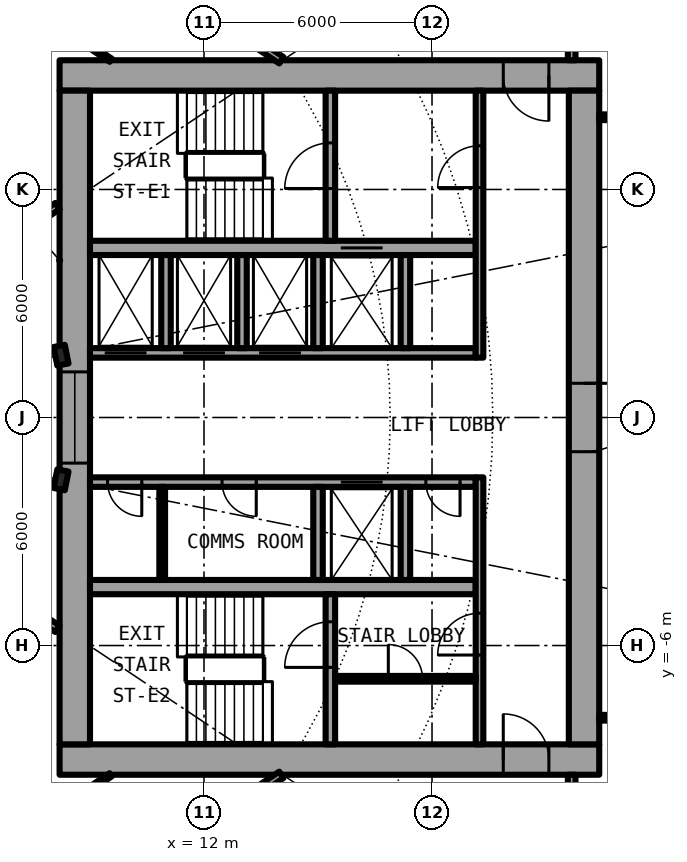
"""IFC4 building model, lengths in metres.
Left out: names, types, materials, properties, quantities, classifications, styles, units other than length and angle.
Written with IfcOpenShell. Run it as: python <this file> out.ifc"""

import sys

from ifc_helpers import new_model, si_unit, direction, frame, frame_2d, origin, origin_2d, place, context, subcontext, project, spatial, rectangle, i_section, extrude, element, fill, save


model = new_model("IFC4")
c1 = context("Model", 3, precision=1e-05, world=origin(), true_north=direction((0.0, 1.0)))
c2 = subcontext(c1, "Body", "Model", "MODEL_VIEW")
j1 = project(units=[si_unit("LENGTHUNIT", "METRE"), si_unit("PLANEANGLEUNIT", "RADIAN")], contexts=[c1])
p1 = place(None, origin())
s1 = spatial("IfcSite", under=j1, at=p1, CompositionType="ELEMENT")
p2 = place(p1, origin())
s2 = spatial("IfcBuilding", under=s1, at=p2, CompositionType="ELEMENT")
p3 = place(p2, frame((0.0, 0.0, 31.95)))
s3 = spatial("IfcBuildingStorey", under=s2, at=p3, CompositionType="ELEMENT", Elevation=31.95)
for number, where, z_axis, x_axis in (
    (1, (8.239, 1.639, 0.0), (0.0, 0.0, 1.0), (0.981, 0.195, 0.0)),
    (2, (8.239, -1.639, 0.0), (0.0, 0.0, 1.0), (0.981, -0.195, 0.0)),
):
    element("IfcColumn", number, at=place(p3, frame(where, z_axis=z_axis, x_axis=x_axis)), inside=s3, PredefinedType="COLUMN", context=c2, shape_type="SweptSolid", body=[
        extrude(i_section(OverallWidth=0.3, OverallDepth=0.5, WebThickness=0.014, FlangeThickness=0.028, FilletRadius=0.027, at=origin_2d()), origin(), (0.0, 0.0, 1.0), 3.05),
    ])
p4 = place(p3, frame((22.4, 9.0, 0.0), z_axis=(0.0, 0.0, 1.0), x_axis=(-1.0, 0.0, 0.0)))
e3 = element("IfcWall", 3, at=p4, inside=s3, PredefinedType="SHEAR", context=c2, shape_type="SweptSolid", body=[
    extrude(rectangle(XDim=14.2, YDim=0.8, at=frame_2d((7.1, 0.0))), origin(), (0.0, 0.0, 1.0), 3.05),
])
p5 = place(p4, frame((1.325, 0.0, 0.0)))
e4 = element("IfcOpeningElement", 4, at=p5, cuts=e3, PredefinedType="OPENING", context=c2, shape_type="SweptSolid", body=[
    extrude(rectangle(XDim=1.2, YDim=2.3, at=frame_2d((0.6, 1.15))), frame((0.0, 0.41, 0.0), z_axis=(0.0, -1.0, 0.0), x_axis=(1.0, 0.0, 0.0)), (0.0, 0.0, 1.0), 0.82),
])
p6 = place(p3, frame((8.2, -9.0, 0.0), z_axis=(0.0, 0.0, 1.0), x_axis=(1.0, 0.0, 0.0)))
e5 = element("IfcWall", 5, at=p6, inside=s3, PredefinedType="SHEAR", context=c2, shape_type="SweptSolid", body=[
    extrude(rectangle(XDim=14.2, YDim=0.8, at=frame_2d((7.1, 0.0))), origin(), (0.0, 0.0, 1.0), 3.05),
])
p7 = place(p6, frame((11.675, 0.0, 0.0)))
e6 = element("IfcOpeningElement", 6, at=p7, cuts=e5, PredefinedType="OPENING", context=c2, shape_type="SweptSolid", body=[
    extrude(rectangle(XDim=1.2, YDim=2.3, at=frame_2d((0.6, 1.15))), frame((0.0, 0.41, 0.0), z_axis=(0.0, -1.0, 0.0), x_axis=(1.0, 0.0, 0.0)), (0.0, 0.0, 1.0), 0.82),
])
p8 = place(p3, frame((22.0, 8.6, 0.0), z_axis=(0.0, 0.0, 1.0), x_axis=(0.0, -1.0, 0.0)))
e7 = element("IfcWall", 7, at=p8, inside=s3, PredefinedType="SHEAR", context=c2, shape_type="SweptSolid", body=[
    extrude(rectangle(XDim=17.2, YDim=0.8, at=frame_2d((8.6, 0.0))), origin(), (0.0, 0.0, 1.0), 3.05),
])
p9 = place(p8, frame((7.7, 0.0, 0.0)))
e8 = element("IfcOpeningElement", 8, at=p9, cuts=e7, PredefinedType="OPENING", context=c2, shape_type="SweptSolid", body=[
    extrude(rectangle(XDim=1.8, YDim=2.3, at=frame_2d((0.9, 1.15))), frame((0.0, 0.41, 0.0), z_axis=(0.0, -1.0, 0.0), x_axis=(1.0, 0.0, 0.0)), (0.0, 0.0, 1.0), 0.82),
])
p10 = place(p3, frame((8.6, -8.6, 0.0), z_axis=(0.0, 0.0, 1.0), x_axis=(0.0, 1.0, 0.0)))
e9 = element("IfcWall", 9, at=p10, inside=s3, PredefinedType="SHEAR", context=c2, shape_type="SweptSolid", body=[
    extrude(rectangle(XDim=17.2, YDim=0.8, at=frame_2d((8.6, 0.0))), origin(), (0.0, 0.0, 1.0), 3.05),
])
p11 = place(p10, frame((7.4, 0.0, 0.1)))
e10 = element("IfcOpeningElement", 10, at=p11, cuts=e9, PredefinedType="OPENING", context=c2, shape_type="SweptSolid", body=[
    extrude(rectangle(XDim=2.4, YDim=2.2, at=frame_2d((1.2, 1.1))), frame((0.0, 0.41, 0.0), z_axis=(0.0, -1.0, 0.0), x_axis=(1.0, 0.0, 0.0)), (0.0, 0.0, 1.0), 0.82),
])
p12 = place(p3, frame((9.0, 1.7, 0.0), z_axis=(0.0, 0.0, 1.0), x_axis=(1.0, 0.0, 0.0)))
e11 = element("IfcWall", 11, at=p12, inside=s3, PredefinedType="SHEAR", context=c2, shape_type="SweptSolid", body=[
    extrude(rectangle(XDim=10.15, YDim=0.25, at=frame_2d((5.075, 0.0))), origin(), (0.0, 0.0, 1.0), 3.05),
])
p13 = place(p12, frame((0.387, 0.0, 0.0)))
e12 = element("IfcOpeningElement", 12, at=p13, cuts=e11, PredefinedType="OPENING", context=c2, shape_type="SweptSolid", body=[
    extrude(rectangle(XDim=1.1, YDim=2.3, at=frame_2d((0.55, 1.15))), frame((0.0, 0.135, 0.0), z_axis=(0.0, -1.0, 0.0), x_axis=(1.0, 0.0, 0.0)), (0.0, 0.0, 1.0), 0.27),
])
p14 = place(p12, frame((2.45, 0.0, 0.0)))
e13 = element("IfcOpeningElement", 13, at=p14, cuts=e11, PredefinedType="OPENING", context=c2, shape_type="SweptSolid", body=[
    extrude(rectangle(XDim=1.1, YDim=2.3, at=frame_2d((0.55, 1.15))), frame((0.0, 0.135, 0.0), z_axis=(0.0, -1.0, 0.0), x_axis=(1.0, 0.0, 0.0)), (0.0, 0.0, 1.0), 0.27),
])
p15 = place(p12, frame((4.45, 0.0, 0.0)))
e14 = element("IfcOpeningElement", 14, at=p15, cuts=e11, PredefinedType="OPENING", context=c2, shape_type="SweptSolid", body=[
    extrude(rectangle(XDim=1.1, YDim=2.3, at=frame_2d((0.55, 1.15))), frame((0.0, 0.135, 0.0), z_axis=(0.0, -1.0, 0.0), x_axis=(1.0, 0.0, 0.0)), (0.0, 0.0, 1.0), 0.27),
])
p16 = place(p3, frame((9.0, 4.462, 0.0), z_axis=(0.0, 0.0, 1.0), x_axis=(1.0, 0.0, 0.0)))
e15 = element("IfcWall", 15, at=p16, inside=s3, PredefinedType="SHEAR", context=c2, shape_type="SweptSolid", body=[
    extrude(rectangle(XDim=10.15, YDim=0.375, at=frame_2d((5.075, 0.0))), origin(), (0.0, 0.0, 1.0), 3.05),
])
p17 = place(p16, frame((6.6, 0.0, 0.0)))
e16 = element("IfcOpeningElement", 16, at=p17, cuts=e15, PredefinedType="OPENING", context=c2, shape_type="SweptSolid", body=[
    extrude(rectangle(XDim=1.1, YDim=2.3, at=frame_2d((0.55, 1.15))), frame((0.0, 0.198, 0.0), z_axis=(0.0, -1.0, 0.0), x_axis=(1.0, 0.0, 0.0)), (0.0, 0.0, 1.0), 0.395),
])
p18 = place(p3, frame((15.325, 4.65, 0.0), z_axis=(0.0, 0.0, 1.0), x_axis=(0.0, 1.0, 0.0)))
e17 = element("IfcWall", 17, at=p18, inside=s3, PredefinedType="SHEAR", context=c2, shape_type="SweptSolid", body=[
    extrude(rectangle(XDim=3.95, YDim=0.25, at=frame_2d((1.975, 0.0))), origin(), (0.0, 0.0, 1.0), 3.05),
])
p19 = place(p18, frame((1.375, 0.0, 0.0)))
e18 = element("IfcOpeningElement", 18, at=p19, cuts=e17, PredefinedType="OPENING", context=c2, shape_type="SweptSolid", body=[
    extrude(rectangle(XDim=1.2, YDim=2.3, at=frame_2d((0.6, 1.15))), frame((0.0, 0.135, 0.0), z_axis=(0.0, -1.0, 0.0), x_axis=(1.0, 0.0, 0.0)), (0.0, 0.0, 1.0), 0.27),
])
for number, where, z_axis, x_axis in (
    (19, (15.0, 1.825, 0.0), (0.0, 0.0, 1.0), (0.0, 1.0, 0.0)),
    (20, (17.3, 1.825, 0.0), (0.0, 0.0, 1.0), (0.0, 1.0, 0.0)),
):
    element("IfcWall", number, at=place(p3, frame(where, z_axis=z_axis, x_axis=x_axis)), inside=s3, PredefinedType="SOLIDWALL", context=c2, shape_type="SweptSolid", body=[
        extrude(rectangle(XDim=2.45, YDim=0.25, at=frame_2d((1.225, 0.0))), origin(), (0.0, 0.0, 1.0), 2.7),
    ])
p20 = place(p3, frame((19.25, 1.575, 0.0), z_axis=(0.0, 0.0, 1.0), x_axis=(0.0, 1.0, 0.0)))
e21 = element("IfcWall", 21, at=p20, inside=s3, PredefinedType="SOLIDWALL", context=c2, shape_type="SweptSolid", body=[
    extrude(rectangle(XDim=7.025, YDim=0.2, at=frame_2d((3.513, 0.0))), origin(), (0.0, 0.0, 1.0), 2.7),
])
p21 = place(p20, frame((4.475, 0.0, 0.0)))
e22 = element("IfcOpeningElement", 22, at=p21, cuts=e21, PredefinedType="OPENING", context=c2, shape_type="SweptSolid", body=[
    extrude(rectangle(XDim=1.1, YDim=2.3, at=frame_2d((0.55, 1.15))), frame((0.0, 0.11, 0.0), z_axis=(0.0, -1.0, 0.0), x_axis=(1.0, 0.0, 0.0)), (0.0, 0.0, 1.0), 0.22),
])
p22 = place(p3, frame((19.15, -1.7, 0.0), z_axis=(0.0, 0.0, 1.0), x_axis=(-1.0, 0.0, 0.0)))
e23 = element("IfcWall", 23, at=p22, inside=s3, PredefinedType="SHEAR", context=c2, shape_type="SweptSolid", body=[
    extrude(rectangle(XDim=10.15, YDim=0.25, at=frame_2d((5.075, 0.0))), origin(), (0.0, 0.0, 1.0), 3.05),
])
p23 = place(p22, frame((2.45, 0.0, 0.0)))
e24 = element("IfcOpeningElement", 24, at=p23, cuts=e23, PredefinedType="OPENING", context=c2, shape_type="SweptSolid", body=[
    extrude(rectangle(XDim=1.1, YDim=2.3, at=frame_2d((0.55, 1.15))), frame((0.0, 0.135, 0.0), z_axis=(0.0, -1.0, 0.0), x_axis=(1.0, 0.0, 0.0)), (0.0, 0.0, 1.0), 0.27),
])
p24 = place(p22, frame((8.788, 0.0, 0.0)))
e25 = element("IfcOpeningElement", 25, at=p24, cuts=e23, PredefinedType="OPENING", context=c2, shape_type="SweptSolid", body=[
    extrude(rectangle(XDim=0.9, YDim=2.3, at=frame_2d((0.45, 1.15))), frame((0.0, 0.135, 0.0), z_axis=(0.0, -1.0, 0.0), x_axis=(1.0, 0.0, 0.0)), (0.0, 0.0, 1.0), 0.27),
])
p25 = place(p22, frame((5.775, 0.0, 0.0)))
e26 = element("IfcOpeningElement", 26, at=p25, cuts=e23, PredefinedType="OPENING", context=c2, shape_type="SweptSolid", body=[
    extrude(rectangle(XDim=0.9, YDim=2.3, at=frame_2d((0.45, 1.15))), frame((0.0, 0.135, 0.0), z_axis=(0.0, -1.0, 0.0), x_axis=(1.0, 0.0, 0.0)), (0.0, 0.0, 1.0), 0.27),
])
p26 = place(p22, frame((0.413, 0.0, 0.0)))
e27 = element("IfcOpeningElement", 27, at=p26, cuts=e23, PredefinedType="OPENING", context=c2, shape_type="SweptSolid", body=[
    extrude(rectangle(XDim=0.9, YDim=2.3, at=frame_2d((0.45, 1.15))), frame((0.0, 0.135, 0.0), z_axis=(0.0, -1.0, 0.0), x_axis=(1.0, 0.0, 0.0)), (0.0, 0.0, 1.0), 0.27),
])
p27 = place(p3, frame((9.0, -4.462, 0.0), z_axis=(0.0, 0.0, 1.0), x_axis=(1.0, 0.0, 0.0)))
e28 = element("IfcWall", 28, at=p27, inside=s3, PredefinedType="SHEAR", context=c2, shape_type="SweptSolid", body=[
    extrude(rectangle(XDim=10.15, YDim=0.375, at=frame_2d((5.075, 0.0))), origin(), (0.0, 0.0, 1.0), 3.05),
])
p28 = place(p3, frame((15.325, -8.6, 0.0), z_axis=(0.0, 0.0, 1.0), x_axis=(0.0, 1.0, 0.0)))
e29 = element("IfcWall", 29, at=p28, inside=s3, PredefinedType="SHEAR", context=c2, shape_type="SweptSolid", body=[
    extrude(rectangle(XDim=3.95, YDim=0.25, at=frame_2d((1.975, 0.0))), origin(), (0.0, 0.0, 1.0), 3.05),
])
p29 = place(p28, frame((2.025, 0.0, 0.0)))
e30 = element("IfcOpeningElement", 30, at=p29, cuts=e29, PredefinedType="OPENING", context=c2, shape_type="SweptSolid", body=[
    extrude(rectangle(XDim=1.2, YDim=2.3, at=frame_2d((0.6, 1.15))), frame((0.0, 0.135, 0.0), z_axis=(0.0, -1.0, 0.0), x_axis=(1.0, 0.0, 0.0)), (0.0, 0.0, 1.0), 0.27),
])
for number, where, z_axis, x_axis in (
    (31, (15.0, -1.825, 0.0), (0.0, 0.0, 1.0), (0.0, -1.0, 0.0)),
    (32, (17.3, -1.825, 0.0), (0.0, 0.0, 1.0), (0.0, -1.0, 0.0)),
):
    element("IfcWall", number, at=place(p3, frame(where, z_axis=z_axis, x_axis=x_axis)), inside=s3, PredefinedType="SOLIDWALL", context=c2, shape_type="SweptSolid", body=[
        extrude(rectangle(XDim=2.45, YDim=0.25, at=frame_2d((1.225, 0.0))), origin(), (0.0, 0.0, 1.0), 2.7),
    ])
p30 = place(p3, frame((19.25, -8.6, 0.0), z_axis=(0.0, 0.0, 1.0), x_axis=(0.0, 1.0, 0.0)))
e33 = element("IfcWall", 33, at=p30, inside=s3, PredefinedType="SOLIDWALL", context=c2, shape_type="SweptSolid", body=[
    extrude(rectangle(XDim=7.025, YDim=0.2, at=frame_2d((3.513, 0.0))), origin(), (0.0, 0.0, 1.0), 2.7),
])
p31 = place(p30, frame((2.35, 0.0, 0.0)))
e34 = element("IfcOpeningElement", 34, at=p31, cuts=e33, PredefinedType="OPENING", context=c2, shape_type="SweptSolid", body=[
    extrude(rectangle(XDim=1.1, YDim=2.3, at=frame_2d((0.55, 1.15))), frame((0.0, 0.11, 0.0), z_axis=(0.0, -1.0, 0.0), x_axis=(1.0, 0.0, 0.0)), (0.0, 0.0, 1.0), 0.22),
])
for number, where, z_axis, x_axis in (
    (35, (11.0, 1.825, 0.0), (0.0, 0.0, 1.0), (0.0, 1.0, 0.0)),
    (36, (13.0, 1.825, 0.0), (0.0, 0.0, 1.0), (0.0, 1.0, 0.0)),
):
    element("IfcWall", number, at=place(p3, frame(where, z_axis=z_axis, x_axis=x_axis)), inside=s3, PredefinedType="SOLIDWALL", context=c2, shape_type="SweptSolid", body=[
        extrude(rectangle(XDim=2.45, YDim=0.25, at=frame_2d((1.225, 0.0))), origin(), (0.0, 0.0, 1.0), 2.7),
    ])
p32 = place(p3, frame((10.9, -1.825, 0.0), z_axis=(0.0, 0.0, 1.0), x_axis=(0.0, -1.0, 0.0)))
e37 = element("IfcWall", 37, at=p32, inside=s3, PredefinedType="PARTITIONING", context=c2, shape_type="SweptSolid", body=[
    extrude(rectangle(XDim=2.45, YDim=0.15, at=frame_2d((1.225, 0.0))), origin(), (0.0, 0.0, 1.0), 2.7),
])
p33 = place(p3, frame((15.45, -6.875, 0.0), z_axis=(0.0, 0.0, 1.0), x_axis=(1.0, 0.0, 0.0)))
e38 = element("IfcWall", 38, at=p33, inside=s3, PredefinedType="PARTITIONING", context=c2, shape_type="SweptSolid", body=[
    extrude(rectangle(XDim=3.7, YDim=0.15, at=frame_2d((1.85, 0.0))), origin(), (0.0, 0.0, 1.0), 2.7),
])
p34 = place(p33, frame((1.4, 0.0, 0.0)))
e39 = element("IfcOpeningElement", 39, at=p34, cuts=e38, PredefinedType="OPENING", context=c2, shape_type="SweptSolid", body=[
    extrude(rectangle(XDim=0.9, YDim=2.3, at=frame_2d((0.45, 1.15))), frame((0.0, 0.085, 0.0), z_axis=(0.0, -1.0, 0.0), x_axis=(1.0, 0.0, 0.0)), (0.0, 0.0, 1.0), 0.17),
])
for number, where, z_axis, x_axis in (
    (40, (22.4, -7.9, 0.0), (0.0, 0.0, 1.0), (1.0, 0.0, 0.0)),
    (41, (22.4, 7.9, 0.0), (0.0, 0.0, 1.0), (1.0, 0.0, 0.0)),
):
    element("IfcWall", number, at=place(p3, frame(where, z_axis=z_axis, x_axis=x_axis)), inside=s3, PredefinedType="PARTITIONING", context=c2, shape_type="SweptSolid", body=[
        extrude(rectangle(XDim=2.54, YDim=0.15, at=frame_2d((1.27, 0.0))), origin(), (0.0, 0.0, 1.0), 2.7),
    ])
for number, where, z_axis, x_axis in (
    (42, (21.675, -11.0, 0.0), (0.0, 0.0, 1.0), (0.0, 1.0, 0.0)),
    (43, (21.675, 9.4, 0.0), (0.0, 0.0, 1.0), (0.0, 1.0, 0.0)),
):
    element("IfcWall", number, at=place(p3, frame(where, z_axis=z_axis, x_axis=x_axis)), inside=s3, PredefinedType="PARTITIONING", context=c2, shape_type="SweptSolid", body=[
        extrude(rectangle(XDim=1.6, YDim=0.2, at=frame_2d((0.8, 0.0))), origin(), (0.0, 0.0, 1.0), 2.7),
    ])
p35 = place(p3, frame((3.297, -16.575, 0.0), z_axis=(0.0, 0.0, 1.0), x_axis=(0.831561346449, 0.555432918625, 0.0)))
e44 = element("IfcWall", 44, at=p35, inside=s3, PredefinedType="PARTITIONING", context=c2, shape_type="SweptSolid", body=[
    extrude(rectangle(XDim=12.914, YDim=0.2, at=frame_2d((6.457, 0.0))), origin(), (0.0, 0.0, 1.0), 2.7),
])
p36 = place(p35, frame((4.352, 0.0, 0.0)))
e45 = element("IfcOpeningElement", 45, at=p36, cuts=e44, PredefinedType="OPENING", context=c2, shape_type="SweptSolid", body=[
    extrude(rectangle(XDim=1.0, YDim=2.3, at=frame_2d((0.5, 1.15))), frame((0.0, 0.11, 0.0), z_axis=(0.0, -1.0, 0.0), x_axis=(1.0, 0.0, 0.0)), (0.0, 0.0, 1.0), 0.22),
])
p37 = place(p3, frame((6.158, -11.664, 0.0), z_axis=(0.0, 0.0, 1.0), x_axis=(0.831459707426, 0.555585056429, 0.0)))
e46 = element("IfcWall", 46, at=p37, inside=s3, PredefinedType="PARTITIONING", context=c2, shape_type="SweptSolid", body=[
    extrude(rectangle(XDim=4.073, YDim=0.1, at=frame_2d((2.037, 0.0))), origin(), (0.0, 0.0, 1.0), 2.7),
])
for number, where, z_axis, x_axis in (
    (47, (6.513, -4.472, 0.0), (0.0, 0.0, 1.0), (0.831, -0.556, 0.0)),
    (48, (6.513, 4.472, 0.0), (0.0, 0.0, 1.0), (0.831, 0.556, 0.0)),
):
    element("IfcWall", number, at=place(p3, frame(where, z_axis=z_axis, x_axis=x_axis)), inside=s3, PredefinedType="PARTITIONING", context=c2, shape_type="SweptSolid", body=[
        extrude(rectangle(XDim=1.962, YDim=0.2, at=frame_2d((0.981, 0.0))), origin(), (0.0, 0.0, 1.0), 2.7),
    ])
p38 = place(p3, frame((6.159, 11.663, 0.0), z_axis=(0.0, 0.0, 1.0), x_axis=(0.831459707426, -0.555585056429, 0.0)))
e49 = element("IfcWall", 49, at=p38, inside=s3, PredefinedType="PARTITIONING", context=c2, shape_type="SweptSolid", body=[
    extrude(rectangle(XDim=4.073, YDim=0.1, at=frame_2d((2.037, 0.0))), origin(), (0.0, 0.0, 1.0), 2.7),
])
p39 = place(p3, frame((3.299, 16.574, 0.0), z_axis=(0.0, 0.0, 1.0), x_axis=(0.831465254975, -0.555576754166, 0.0)))
e50 = element("IfcWall", 50, at=p39, inside=s3, PredefinedType="PARTITIONING", context=c2, shape_type="SweptSolid", body=[
    extrude(rectangle(XDim=12.915, YDim=0.2, at=frame_2d((6.457, 0.0))), origin(), (0.0, 0.0, 1.0), 2.7),
])
p40 = place(p39, frame((4.346, 0.0, 0.0)))
e51 = element("IfcOpeningElement", 51, at=p40, cuts=e50, PredefinedType="OPENING", context=c2, shape_type="SweptSolid", body=[
    extrude(rectangle(XDim=1.0, YDim=2.3, at=frame_2d((0.5, 1.15))), frame((0.0, 0.11, 0.0), z_axis=(0.0, -1.0, 0.0), x_axis=(1.0, 0.0, 0.0)), (0.0, 0.0, 1.0), 0.22),
])
p41 = place(p13, origin())
e52 = element("IfcDoor", 52, at=p41, inside=s3, OperationType="DOUBLE_DOOR_SLIDING", PredefinedType="DOOR", context=c2, shape_type="SweptSolid", body=[
    extrude(rectangle(XDim=1.1, YDim=2.3, at=frame_2d((0.55, 1.15))), frame((0.0, 0.025, 0.0), z_axis=(0.0, -1.0, 0.0), x_axis=(1.0, 0.0, 0.0)), (0.0, 0.0, 1.0), 0.05),
])
fill(e12, e52)
p42 = place(p14, origin())
e53 = element("IfcDoor", 53, at=p42, inside=s3, OperationType="DOUBLE_DOOR_SLIDING", PredefinedType="DOOR", context=c2, shape_type="SweptSolid", body=[
    extrude(rectangle(XDim=1.1, YDim=2.3, at=frame_2d((0.55, 1.15))), frame((0.0, 0.025, 0.0), z_axis=(0.0, -1.0, 0.0), x_axis=(1.0, 0.0, 0.0)), (0.0, 0.0, 1.0), 0.05),
])
fill(e13, e53)
p43 = place(p15, origin())
e54 = element("IfcDoor", 54, at=p43, inside=s3, OperationType="DOUBLE_DOOR_SLIDING", PredefinedType="DOOR", context=c2, shape_type="SweptSolid", body=[
    extrude(rectangle(XDim=1.1, YDim=2.3, at=frame_2d((0.55, 1.15))), frame((0.0, 0.025, 0.0), z_axis=(0.0, -1.0, 0.0), x_axis=(1.0, 0.0, 0.0)), (0.0, 0.0, 1.0), 0.05),
])
fill(e14, e54)
p44 = place(p17, origin())
e55 = element("IfcDoor", 55, at=p44, inside=s3, OperationType="DOUBLE_DOOR_SLIDING", PredefinedType="DOOR", context=c2, shape_type="SweptSolid", body=[
    extrude(rectangle(XDim=1.1, YDim=2.3, at=frame_2d((0.55, 1.15))), frame((0.0, 0.025, 0.0), z_axis=(0.0, -1.0, 0.0), x_axis=(1.0, 0.0, 0.0)), (0.0, 0.0, 1.0), 0.05),
])
fill(e16, e55)
p45 = place(p23, origin())
e56 = element("IfcDoor", 56, at=p45, inside=s3, OperationType="DOUBLE_DOOR_SLIDING", PredefinedType="DOOR", context=c2, shape_type="SweptSolid", body=[
    extrude(rectangle(XDim=1.1, YDim=2.3, at=frame_2d((0.55, 1.15))), frame((0.0, 0.025, 0.0), z_axis=(0.0, -1.0, 0.0), x_axis=(1.0, 0.0, 0.0)), (0.0, 0.0, 1.0), 0.05),
])
fill(e24, e56)
p46 = place(p24, origin())
e57 = element("IfcDoor", 57, at=p46, inside=s3, OperationType="SINGLE_SWING_LEFT", PredefinedType="DOOR", context=c2, shape_type="SweptSolid", body=[
    extrude(rectangle(XDim=0.9, YDim=2.3, at=frame_2d((0.45, 1.15))), frame((0.0, 0.025, 0.0), z_axis=(0.0, -1.0, 0.0), x_axis=(1.0, 0.0, 0.0)), (0.0, 0.0, 1.0), 0.05),
])
fill(e25, e57)
p47 = place(p25, origin())
e58 = element("IfcDoor", 58, at=p47, inside=s3, OperationType="SINGLE_SWING_LEFT", PredefinedType="DOOR", context=c2, shape_type="SweptSolid", body=[
    extrude(rectangle(XDim=0.9, YDim=2.3, at=frame_2d((0.45, 1.15))), frame((0.0, 0.025, 0.0), z_axis=(0.0, -1.0, 0.0), x_axis=(1.0, 0.0, 0.0)), (0.0, 0.0, 1.0), 0.05),
])
fill(e26, e58)
p48 = place(p26, origin())
e59 = element("IfcDoor", 59, at=p48, inside=s3, OperationType="SINGLE_SWING_RIGHT", PredefinedType="DOOR", context=c2, shape_type="SweptSolid", body=[
    extrude(rectangle(XDim=0.9, YDim=2.3, at=frame_2d((0.45, 1.15))), frame((0.0, 0.025, 0.0), z_axis=(0.0, -1.0, 0.0), x_axis=(1.0, 0.0, 0.0)), (0.0, 0.0, 1.0), 0.05),
])
fill(e27, e59)
p49 = place(p34, origin())
e60 = element("IfcDoor", 60, at=p49, inside=s3, OperationType="SINGLE_SWING_LEFT", PredefinedType="DOOR", context=c2, shape_type="SweptSolid", body=[
    extrude(rectangle(XDim=0.9, YDim=2.3, at=frame_2d((0.45, 1.15))), frame((0.0, 0.025, 0.0), z_axis=(0.0, -1.0, 0.0), x_axis=(1.0, 0.0, 0.0)), (0.0, 0.0, 1.0), 0.05),
])
fill(e39, e60)
p50 = place(p19, origin())
e61 = element("IfcDoor", 61, at=p50, inside=s3, OperationType="SINGLE_SWING_LEFT", PredefinedType="DOOR", context=c2, shape_type="SweptSolid", body=[
    extrude(rectangle(XDim=1.2, YDim=2.3, at=frame_2d((0.6, 1.15))), frame((0.0, 0.025, 0.0), z_axis=(0.0, -1.0, 0.0), x_axis=(1.0, 0.0, 0.0)), (0.0, 0.0, 1.0), 0.05),
])
fill(e18, e61)
p51 = place(p29, origin())
e62 = element("IfcDoor", 62, at=p51, inside=s3, OperationType="SINGLE_SWING_LEFT", PredefinedType="DOOR", context=c2, shape_type="SweptSolid", body=[
    extrude(rectangle(XDim=1.2, YDim=2.3, at=frame_2d((0.6, 1.15))), frame((0.0, 0.025, 0.0), z_axis=(0.0, -1.0, 0.0), x_axis=(1.0, 0.0, 0.0)), (0.0, 0.0, 1.0), 0.05),
])
fill(e30, e62)
p52 = place(p21, origin())
e63 = element("IfcDoor", 63, at=p52, inside=s3, OperationType="SINGLE_SWING_LEFT", PredefinedType="DOOR", context=c2, shape_type="SweptSolid", body=[
    extrude(rectangle(XDim=1.1, YDim=2.3, at=frame_2d((0.55, 1.15))), frame((0.0, 0.025, 0.0), z_axis=(0.0, -1.0, 0.0), x_axis=(1.0, 0.0, 0.0)), (0.0, 0.0, 1.0), 0.05),
])
fill(e22, e63)
p53 = place(p31, origin())
e64 = element("IfcDoor", 64, at=p53, inside=s3, OperationType="SINGLE_SWING_RIGHT", PredefinedType="DOOR", context=c2, shape_type="SweptSolid", body=[
    extrude(rectangle(XDim=1.1, YDim=2.3, at=frame_2d((0.55, 1.15))), frame((0.0, 0.025, 0.0), z_axis=(0.0, -1.0, 0.0), x_axis=(1.0, 0.0, 0.0)), (0.0, 0.0, 1.0), 0.05),
])
fill(e34, e64)
p54 = place(p5, origin())
e65 = element("IfcDoor", 65, at=p54, inside=s3, OperationType="SINGLE_SWING_RIGHT", PredefinedType="DOOR", context=c2, shape_type="SweptSolid", body=[
    extrude(rectangle(XDim=1.2, YDim=2.3, at=frame_2d((0.6, 1.15))), frame((0.0, 0.025, 0.0), z_axis=(0.0, -1.0, 0.0), x_axis=(1.0, 0.0, 0.0)), (0.0, 0.0, 1.0), 0.05),
])
fill(e4, e65)
p55 = place(p7, origin())
e66 = element("IfcDoor", 66, at=p55, inside=s3, OperationType="SINGLE_SWING_LEFT", PredefinedType="DOOR", context=c2, shape_type="SweptSolid", body=[
    extrude(rectangle(XDim=1.2, YDim=2.3, at=frame_2d((0.6, 1.15))), frame((0.0, 0.025, 0.0), z_axis=(0.0, -1.0, 0.0), x_axis=(1.0, 0.0, 0.0)), (0.0, 0.0, 1.0), 0.05),
])
fill(e6, e66)
p56 = place(p9, origin())
e67 = element("IfcDoor", 67, at=p56, inside=s3, OperationType="SINGLE_SWING_LEFT", PredefinedType="DOOR", context=c2, shape_type="SweptSolid", body=[
    extrude(rectangle(XDim=1.8, YDim=2.3, at=frame_2d((0.9, 1.15))), frame((0.0, 0.025, 0.0), z_axis=(0.0, -1.0, 0.0), x_axis=(1.0, 0.0, 0.0)), (0.0, 0.0, 1.0), 0.05),
])
fill(e8, e67)
p57 = place(p11, origin())
e68 = element("IfcWindow", 68, at=p57, inside=s3, PartitioningType="SINGLE_PANEL", PredefinedType="WINDOW", context=c2, shape_type="SweptSolid", body=[
    extrude(rectangle(XDim=2.4, YDim=2.2, at=frame_2d((1.2, 1.1))), frame((0.0, 0.03, 0.0), z_axis=(0.0, -1.0, 0.0), x_axis=(1.0, 0.0, 0.0)), (0.0, 0.0, 1.0), 0.06),
])
fill(e10, e68)
save(model, sys.argv[1])
